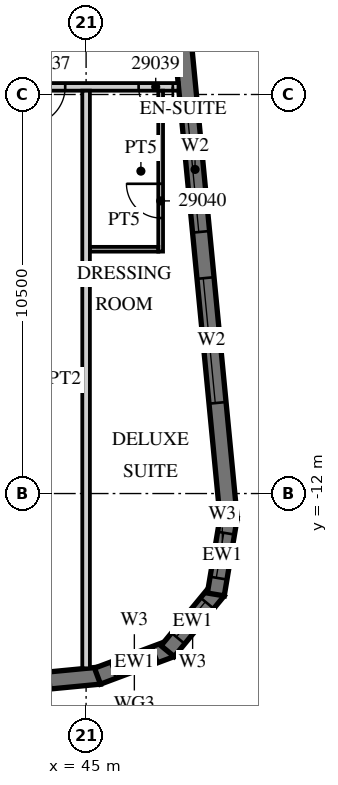
"""IFC4 building model, lengths in metres.
Left out: names, types, materials, properties, quantities, classifications, styles, units other than length and angle.
Written with IfcOpenShell. Run it as: python <this file> out.ifc"""

import sys

from ifc_helpers import new_model, si_unit, direction, frame, frame_2d, origin, place, context, subcontext, project, spatial, polyline, rectangle, outline, extrude, element, fill, save


model = new_model("IFC4")
c1 = context("Model", 3, precision=1e-05, world=origin(), true_north=direction((0.0, 1.0)))
c2 = subcontext(c1, "Body", "Model", "MODEL_VIEW")
j1 = project(units=[si_unit("LENGTHUNIT", "METRE"), si_unit("PLANEANGLEUNIT", "RADIAN")], contexts=[c1])
p1 = place(None, origin())
s1 = spatial("IfcSite", under=j1, at=p1, CompositionType="ELEMENT")
p2 = place(p1, origin())
s2 = spatial("IfcBuilding", under=s1, at=p2, CompositionType="ELEMENT")
p3 = place(p2, frame((0.0, 0.0, 130.6)))
s3 = spatial("IfcBuildingStorey", under=s2, at=p3, CompositionType="ELEMENT", Elevation=130.6)
p4 = place(p3, frame((-13.521, -22.46, 0.0), z_axis=(0.0, 0.0, 1.0), x_axis=(0.995396096335, 0.095846812164, 0.0)))
e1 = element("IfcWall", 1, at=p4, inside=s3, PredefinedType="SOLIDWALL", context=c2, shape_type="SweptSolid", body=[
    extrude(rectangle(XDim=59.151, YDim=0.45, at=frame_2d((29.575, 0.0))), origin(), (0.0, 0.0, 1.0), 3.02),
])
p5 = place(p4, frame((0.91, 0.0, 0.45)))
e2 = element("IfcOpeningElement", 2, at=p5, cuts=e1, PredefinedType="OPENING", context=c2, shape_type="SweptSolid", body=[
    extrude(rectangle(XDim=2.7, YDim=2.25, at=frame_2d((1.35, 1.125))), frame((0.0, 0.235, 0.0), z_axis=(0.0, -1.0, 0.0), x_axis=(1.0, 0.0, 0.0)), (0.0, 0.0, 1.0), 0.47),
])
p6 = place(p4, frame((5.431, 0.0, 0.45)))
e3 = element("IfcOpeningElement", 3, at=p6, cuts=e1, PredefinedType="OPENING", context=c2, shape_type="SweptSolid", body=[
    extrude(rectangle(XDim=2.7, YDim=2.25, at=frame_2d((1.35, 1.125))), frame((0.0, 0.235, 0.0), z_axis=(0.0, -1.0, 0.0), x_axis=(1.0, 0.0, 0.0)), (0.0, 0.0, 1.0), 0.47),
])
p7 = place(p4, frame((9.952, 0.0, 0.45)))
e4 = element("IfcOpeningElement", 4, at=p7, cuts=e1, PredefinedType="OPENING", context=c2, shape_type="SweptSolid", body=[
    extrude(rectangle(XDim=2.7, YDim=2.25, at=frame_2d((1.35, 1.125))), frame((0.0, 0.235, 0.0), z_axis=(0.0, -1.0, 0.0), x_axis=(1.0, 0.0, 0.0)), (0.0, 0.0, 1.0), 0.47),
])
p8 = place(p4, frame((14.473, 0.0, 0.45)))
e5 = element("IfcOpeningElement", 5, at=p8, cuts=e1, PredefinedType="OPENING", context=c2, shape_type="SweptSolid", body=[
    extrude(rectangle(XDim=2.7, YDim=2.25, at=frame_2d((1.35, 1.125))), frame((0.0, 0.235, 0.0), z_axis=(0.0, -1.0, 0.0), x_axis=(1.0, 0.0, 0.0)), (0.0, 0.0, 1.0), 0.47),
])
p9 = place(p4, frame((18.994, 0.0, 0.45)))
e6 = element("IfcOpeningElement", 6, at=p9, cuts=e1, PredefinedType="OPENING", context=c2, shape_type="SweptSolid", body=[
    extrude(rectangle(XDim=2.7, YDim=2.25, at=frame_2d((1.35, 1.125))), frame((0.0, 0.235, 0.0), z_axis=(0.0, -1.0, 0.0), x_axis=(1.0, 0.0, 0.0)), (0.0, 0.0, 1.0), 0.47),
])
p10 = place(p4, frame((23.514, 0.0, 0.45)))
e7 = element("IfcOpeningElement", 7, at=p10, cuts=e1, PredefinedType="OPENING", context=c2, shape_type="SweptSolid", body=[
    extrude(rectangle(XDim=2.7, YDim=2.25, at=frame_2d((1.35, 1.125))), frame((0.0, 0.235, 0.0), z_axis=(0.0, -1.0, 0.0), x_axis=(1.0, 0.0, 0.0)), (0.0, 0.0, 1.0), 0.47),
])
p11 = place(p4, frame((28.035, 0.0, 0.45)))
e8 = element("IfcOpeningElement", 8, at=p11, cuts=e1, PredefinedType="OPENING", context=c2, shape_type="SweptSolid", body=[
    extrude(rectangle(XDim=2.7, YDim=2.25, at=frame_2d((1.35, 1.125))), frame((0.0, 0.235, 0.0), z_axis=(0.0, -1.0, 0.0), x_axis=(1.0, 0.0, 0.0)), (0.0, 0.0, 1.0), 0.47),
])
p12 = place(p4, frame((32.556, 0.0, 0.45)))
e9 = element("IfcOpeningElement", 9, at=p12, cuts=e1, PredefinedType="OPENING", context=c2, shape_type="SweptSolid", body=[
    extrude(rectangle(XDim=2.7, YDim=2.25, at=frame_2d((1.35, 1.125))), frame((0.0, 0.235, 0.0), z_axis=(0.0, -1.0, 0.0), x_axis=(1.0, 0.0, 0.0)), (0.0, 0.0, 1.0), 0.47),
])
p13 = place(p4, frame((37.077, 0.0, 0.45)))
e10 = element("IfcOpeningElement", 10, at=p13, cuts=e1, PredefinedType="OPENING", context=c2, shape_type="SweptSolid", body=[
    extrude(rectangle(XDim=2.7, YDim=2.25, at=frame_2d((1.35, 1.125))), frame((0.0, 0.235, 0.0), z_axis=(0.0, -1.0, 0.0), x_axis=(1.0, 0.0, 0.0)), (0.0, 0.0, 1.0), 0.47),
])
p14 = place(p4, frame((41.598, 0.0, 0.45)))
e11 = element("IfcOpeningElement", 11, at=p14, cuts=e1, PredefinedType="OPENING", context=c2, shape_type="SweptSolid", body=[
    extrude(rectangle(XDim=2.7, YDim=2.25, at=frame_2d((1.35, 1.125))), frame((0.0, 0.235, 0.0), z_axis=(0.0, -1.0, 0.0), x_axis=(1.0, 0.0, 0.0)), (0.0, 0.0, 1.0), 0.47),
])
p15 = place(p4, frame((46.118, 0.0, 0.45)))
e12 = element("IfcOpeningElement", 12, at=p15, cuts=e1, PredefinedType="OPENING", context=c2, shape_type="SweptSolid", body=[
    extrude(rectangle(XDim=2.7, YDim=2.25, at=frame_2d((1.35, 1.125))), frame((0.0, 0.235, 0.0), z_axis=(0.0, -1.0, 0.0), x_axis=(1.0, 0.0, 0.0)), (0.0, 0.0, 1.0), 0.47),
])
p16 = place(p4, frame((50.639, 0.0, 0.45)))
e13 = element("IfcOpeningElement", 13, at=p16, cuts=e1, PredefinedType="OPENING", context=c2, shape_type="SweptSolid", body=[
    extrude(rectangle(XDim=2.7, YDim=2.25, at=frame_2d((1.35, 1.125))), frame((0.0, 0.235, 0.0), z_axis=(0.0, -1.0, 0.0), x_axis=(1.0, 0.0, 0.0)), (0.0, 0.0, 1.0), 0.47),
])
p17 = place(p4, frame((55.15, 0.0, 0.45)))
e14 = element("IfcOpeningElement", 14, at=p17, cuts=e1, PredefinedType="OPENING", context=c2, shape_type="SweptSolid", body=[
    extrude(rectangle(XDim=2.7, YDim=2.25, at=frame_2d((1.35, 1.125))), frame((0.0, 0.235, 0.0), z_axis=(0.0, -1.0, 0.0), x_axis=(1.0, 0.0, 0.0)), (0.0, 0.0, 1.0), 0.47),
])
p18 = place(p3, frame((45.3, -16.804, 0.0), z_axis=(0.0, 0.0, 1.0), x_axis=(0.936677599948, 0.350192909346, 0.0)))
e15 = element("IfcWall", 15, at=p18, inside=s3, PredefinedType="SOLIDWALL", context=c2, shape_type="SweptSolid", body=[
    extrude(outline(polyline([(0.0, -0.225), (2.071, -0.225), (1.95, 0.225), (0.121, 0.225), (0.0, -0.225)])), origin(), (0.0, 0.0, 1.0), 3.02),
])
p19 = place(p18, frame((0.435, 0.0, 0.45)))
e16 = element("IfcOpeningElement", 16, at=p19, cuts=e15, PredefinedType="OPENING", context=c2, shape_type="SweptSolid", body=[
    extrude(rectangle(XDim=1.2, YDim=2.25, at=frame_2d((0.6, 1.125))), frame((0.0, 0.235, 0.0), z_axis=(0.0, -1.0, 0.0), x_axis=(1.0, 0.0, 0.0)), (0.0, 0.0, 1.0), 0.47),
])
p20 = place(p3, frame((47.145, -16.147, 0.0), z_axis=(0.0, 0.0, 1.0), x_axis=(0.635988241739, 0.771698747161, 0.0)))
e17 = element("IfcWall", 17, at=p20, inside=s3, PredefinedType="SOLIDWALL", context=c2, shape_type="SweptSolid", body=[
    extrude(outline(polyline([(0.0, -0.225), (2.071, -0.225), (1.95, 0.225), (0.121, 0.225), (0.0, -0.225)])), origin(), (0.0, 0.0, 1.0), 3.02),
])
p21 = place(p20, frame((0.435, 0.0, 0.45)))
e18 = element("IfcOpeningElement", 18, at=p21, cuts=e17, PredefinedType="OPENING", context=c2, shape_type="SweptSolid", body=[
    extrude(rectangle(XDim=1.2, YDim=2.25, at=frame_2d((0.6, 1.125))), frame((0.0, 0.235, 0.0), z_axis=(0.0, -1.0, 0.0), x_axis=(1.0, 0.0, 0.0)), (0.0, 0.0, 1.0), 0.47),
])
p22 = place(p3, frame((48.413, -14.655, 0.0), z_axis=(0.0, 0.0, 1.0), x_axis=(0.165068144653, 0.986282164302, 0.0)))
e19 = element("IfcWall", 19, at=p22, inside=s3, PredefinedType="SOLIDWALL", context=c2, shape_type="SweptSolid", body=[
    extrude(outline(polyline([(0.0, -0.225), (2.071, -0.225), (1.95, 0.225), (0.121, 0.225), (0.0, -0.225)])), origin(), (0.0, 0.0, 1.0), 3.02),
])
p23 = place(p22, frame((0.435, 0.0, 0.45)))
e20 = element("IfcOpeningElement", 20, at=p23, cuts=e19, PredefinedType="OPENING", context=c2, shape_type="SweptSolid", body=[
    extrude(rectangle(XDim=1.2, YDim=2.25, at=frame_2d((0.6, 1.125))), frame((0.0, 0.235, 0.0), z_axis=(0.0, -1.0, 0.0), x_axis=(1.0, 0.0, 0.0)), (0.0, 0.0, 1.0), 0.47),
])
p24 = place(p3, frame((48.753, -12.672, 0.0), z_axis=(0.0, 0.0, 1.0), x_axis=(-0.095842661909, 0.995396495954, 0.0)))
e21 = element("IfcWall", 21, at=p24, inside=s3, PredefinedType="SOLIDWALL", context=c2, shape_type="SweptSolid", body=[
    extrude(rectangle(XDim=35.0, YDim=0.45, at=frame_2d((17.5, 0.0))), origin(), (0.0, 0.0, 1.0), 3.02),
])
p25 = place(p24, frame((3.072, 0.0, 0.45)))
e22 = element("IfcOpeningElement", 22, at=p25, cuts=e21, PredefinedType="OPENING", context=c2, shape_type="SweptSolid", body=[
    extrude(rectangle(XDim=3.3, YDim=2.25, at=frame_2d((1.65, 1.125))), frame((0.0, 0.235, 0.0), z_axis=(0.0, -1.0, 0.0), x_axis=(1.0, 0.0, 0.0)), (0.0, 0.0, 1.0), 0.47),
])
p26 = place(p24, frame((7.593, 0.0, 0.45)))
e23 = element("IfcOpeningElement", 23, at=p26, cuts=e21, PredefinedType="OPENING", context=c2, shape_type="SweptSolid", body=[
    extrude(rectangle(XDim=3.3, YDim=2.25, at=frame_2d((1.65, 1.125))), frame((0.0, 0.235, 0.0), z_axis=(0.0, -1.0, 0.0), x_axis=(1.0, 0.0, 0.0)), (0.0, 0.0, 1.0), 0.47),
])
p27 = place(p3, frame((-13.5, -1.3, 0.0), z_axis=(0.0, 0.0, 1.0), x_axis=(1.0, 0.0, 0.0)))
e24 = element("IfcWall", 24, at=p27, inside=s3, PredefinedType="PARTITIONING", context=c2, shape_type="SweptSolid", body=[
    extrude(rectangle(XDim=60.932, YDim=0.2, at=frame_2d((30.466, 0.0))), origin(), (0.0, 0.0, 1.0), 3.02),
])
p28 = place(p27, frame((2.925, 0.0, 0.0)))
e25 = element("IfcOpeningElement", 25, at=p28, cuts=e24, PredefinedType="OPENING", context=c2, shape_type="SweptSolid", body=[
    extrude(rectangle(XDim=1.0, YDim=2.1, at=frame_2d((0.5, 1.05))), frame((0.0, 0.11, 0.0), z_axis=(0.0, -1.0, 0.0), x_axis=(1.0, 0.0, 0.0)), (0.0, 0.0, 1.0), 0.22),
])
p29 = place(p27, frame((9.863, 0.0, 0.0)))
e26 = element("IfcOpeningElement", 26, at=p29, cuts=e24, PredefinedType="OPENING", context=c2, shape_type="SweptSolid", body=[
    extrude(rectangle(XDim=1.2, YDim=2.1, at=frame_2d((0.6, 1.05))), frame((0.0, 0.11, 0.0), z_axis=(0.0, -1.0, 0.0), x_axis=(1.0, 0.0, 0.0)), (0.0, 0.0, 1.0), 0.22),
])
p30 = place(p27, frame((14.075, 0.0, 0.0)))
e27 = element("IfcOpeningElement", 27, at=p30, cuts=e24, PredefinedType="OPENING", context=c2, shape_type="SweptSolid", body=[
    extrude(rectangle(XDim=1.0, YDim=2.1, at=frame_2d((0.5, 1.05))), frame((0.0, 0.11, 0.0), z_axis=(0.0, -1.0, 0.0), x_axis=(1.0, 0.0, 0.0)), (0.0, 0.0, 1.0), 0.22),
])
p31 = place(p27, frame((18.55, 0.0, 0.0)))
e28 = element("IfcOpeningElement", 28, at=p31, cuts=e24, PredefinedType="OPENING", context=c2, shape_type="SweptSolid", body=[
    extrude(rectangle(XDim=1.0, YDim=2.1, at=frame_2d((0.5, 1.05))), frame((0.0, 0.11, 0.0), z_axis=(0.0, -1.0, 0.0), x_axis=(1.0, 0.0, 0.0)), (0.0, 0.0, 1.0), 0.22),
])
p32 = place(p27, frame((24.938, 0.0, 0.0)))
e29 = element("IfcOpeningElement", 29, at=p32, cuts=e24, PredefinedType="OPENING", context=c2, shape_type="SweptSolid", body=[
    extrude(rectangle(XDim=1.2, YDim=2.1, at=frame_2d((0.6, 1.05))), frame((0.0, 0.11, 0.0), z_axis=(0.0, -1.0, 0.0), x_axis=(1.0, 0.0, 0.0)), (0.0, 0.0, 1.0), 0.22),
])
p33 = place(p27, frame((36.862, 0.0, 0.0)))
e30 = element("IfcOpeningElement", 30, at=p33, cuts=e24, PredefinedType="OPENING", context=c2, shape_type="SweptSolid", body=[
    extrude(rectangle(XDim=1.2, YDim=2.1, at=frame_2d((0.6, 1.05))), frame((0.0, 0.11, 0.0), z_axis=(0.0, -1.0, 0.0), x_axis=(1.0, 0.0, 0.0)), (0.0, 0.0, 1.0), 0.22),
])
p34 = place(p27, frame((41.075, 0.0, 0.0)))
e31 = element("IfcOpeningElement", 31, at=p34, cuts=e24, PredefinedType="OPENING", context=c2, shape_type="SweptSolid", body=[
    extrude(rectangle(XDim=1.0, YDim=2.1, at=frame_2d((0.5, 1.05))), frame((0.0, 0.11, 0.0), z_axis=(0.0, -1.0, 0.0), x_axis=(1.0, 0.0, 0.0)), (0.0, 0.0, 1.0), 0.22),
])
p35 = place(p27, frame((45.55, 0.0, 0.0)))
e32 = element("IfcOpeningElement", 32, at=p35, cuts=e24, PredefinedType="OPENING", context=c2, shape_type="SweptSolid", body=[
    extrude(rectangle(XDim=1.0, YDim=2.1, at=frame_2d((0.5, 1.05))), frame((0.0, 0.11, 0.0), z_axis=(0.0, -1.0, 0.0), x_axis=(1.0, 0.0, 0.0)), (0.0, 0.0, 1.0), 0.22),
])
p36 = place(p27, frame((52.425, 0.0, 0.0)))
e33 = element("IfcOpeningElement", 33, at=p36, cuts=e24, PredefinedType="OPENING", context=c2, shape_type="SweptSolid", body=[
    extrude(rectangle(XDim=1.0, YDim=2.1, at=frame_2d((0.5, 1.05))), frame((0.0, 0.11, 0.0), z_axis=(0.0, -1.0, 0.0), x_axis=(1.0, 0.0, 0.0)), (0.0, 0.0, 1.0), 0.22),
])
p37 = place(p27, frame((56.95, 0.0, 0.0)))
e34 = element("IfcOpeningElement", 34, at=p37, cuts=e24, PredefinedType="OPENING", context=c2, shape_type="SweptSolid", body=[
    extrude(rectangle(XDim=1.0, YDim=2.1, at=frame_2d((0.5, 1.05))), frame((0.0, 0.11, 0.0), z_axis=(0.0, -1.0, 0.0), x_axis=(1.0, 0.0, 0.0)), (0.0, 0.0, 1.0), 0.22),
])
p38 = place(p27, frame((59.882, 0.0, 0.0)))
e35 = element("IfcOpeningElement", 35, at=p38, cuts=e24, PredefinedType="OPENING", context=c2, shape_type="SweptSolid", body=[
    extrude(rectangle(XDim=0.9, YDim=2.1, at=frame_2d((0.45, 1.05))), frame((0.0, 0.11, 0.0), z_axis=(0.0, -1.0, 0.0), x_axis=(1.0, 0.0, 0.0)), (0.0, 0.0, 1.0), 0.22),
])
p39 = place(p3, frame((45.0, -16.599, 0.0), z_axis=(0.0, 0.0, 1.0), x_axis=(0.0, 1.0, 0.0)))
e36 = element("IfcWall", 36, at=p39, inside=s3, PredefinedType="PARTITIONING", context=c2, shape_type="SweptSolid", body=[
    extrude(rectangle(XDim=15.199, YDim=0.2, at=frame_2d((7.6, 0.0))), origin(), (0.0, 0.0, 1.0), 3.02),
])
p40 = place(p3, frame((46.962, -5.634, 0.0), z_axis=(0.0, 0.0, 1.0), x_axis=(0.0, 1.0, 0.0)))
e37 = element("IfcWall", 37, at=p40, inside=s3, PredefinedType="PARTITIONING", context=c2, shape_type="SweptSolid", body=[
    extrude(rectangle(XDim=4.234, YDim=0.125, at=frame_2d((2.117, 0.0))), origin(), (0.0, 0.0, 1.0), 3.02),
])
p41 = place(p40, frame((0.884, 0.0, 0.0)))
e38 = element("IfcOpeningElement", 38, at=p41, cuts=e37, PredefinedType="OPENING", context=c2, shape_type="SweptSolid", body=[
    extrude(rectangle(XDim=0.9, YDim=2.1, at=frame_2d((0.45, 1.05))), frame((0.0, 0.073, 0.0), z_axis=(0.0, -1.0, 0.0), x_axis=(1.0, 0.0, 0.0)), (0.0, 0.0, 1.0), 0.145),
])
p42 = place(p3, frame((45.1, -5.572, 0.0), z_axis=(0.0, 0.0, 1.0), x_axis=(1.0, 0.0, 0.0)))
e39 = element("IfcWall", 39, at=p42, inside=s3, PredefinedType="PARTITIONING", context=c2, shape_type="SweptSolid", body=[
    extrude(rectangle(XDim=1.8, YDim=0.125, at=frame_2d((0.9, 0.0))), origin(), (0.0, 0.0, 1.0), 3.02),
])
p43 = place(p19, origin())
e40 = element("IfcWindow", 40, at=p43, inside=s3, PartitioningType="SINGLE_PANEL", PredefinedType="WINDOW", context=c2, shape_type="SweptSolid", body=[
    extrude(rectangle(XDim=1.2, YDim=2.25, at=frame_2d((0.6, 1.125))), frame((0.0, 0.09, 0.0), z_axis=(0.0, -1.0, 0.0), x_axis=(1.0, 0.0, 0.0)), (0.0, 0.0, 1.0), 0.06),
])
fill(e16, e40)
p44 = place(p21, origin())
e41 = element("IfcWindow", 41, at=p44, inside=s3, PartitioningType="SINGLE_PANEL", PredefinedType="WINDOW", context=c2, shape_type="SweptSolid", body=[
    extrude(rectangle(XDim=1.2, YDim=2.25, at=frame_2d((0.6, 1.125))), frame((0.0, 0.09, 0.0), z_axis=(0.0, -1.0, 0.0), x_axis=(1.0, 0.0, 0.0)), (0.0, 0.0, 1.0), 0.06),
])
fill(e18, e41)
p45 = place(p23, origin())
e42 = element("IfcWindow", 42, at=p45, inside=s3, PartitioningType="SINGLE_PANEL", PredefinedType="WINDOW", context=c2, shape_type="SweptSolid", body=[
    extrude(rectangle(XDim=1.2, YDim=2.25, at=frame_2d((0.6, 1.125))), frame((0.0, 0.09, 0.0), z_axis=(0.0, -1.0, 0.0), x_axis=(1.0, 0.0, 0.0)), (0.0, 0.0, 1.0), 0.06),
])
fill(e20, e42)
p46 = place(p25, origin())
e43 = element("IfcWindow", 43, at=p46, inside=s3, PartitioningType="SINGLE_PANEL", PredefinedType="WINDOW", context=c2, shape_type="SweptSolid", body=[
    extrude(rectangle(XDim=3.3, YDim=2.25, at=frame_2d((1.65, 1.125))), frame((0.0, 0.09, 0.0), z_axis=(0.0, -1.0, 0.0), x_axis=(1.0, 0.0, 0.0)), (0.0, 0.0, 1.0), 0.06),
])
fill(e22, e43)
p47 = place(p26, origin())
e44 = element("IfcWindow", 44, at=p47, inside=s3, PartitioningType="SINGLE_PANEL", PredefinedType="WINDOW", context=c2, shape_type="SweptSolid", body=[
    extrude(rectangle(XDim=3.3, YDim=2.25, at=frame_2d((1.65, 1.125))), frame((0.0, 0.09, 0.0), z_axis=(0.0, -1.0, 0.0), x_axis=(1.0, 0.0, 0.0)), (0.0, 0.0, 1.0), 0.06),
])
fill(e23, e44)
p48 = place(p37, origin())
e45 = element("IfcDoor", 45, at=p48, inside=s3, OperationType="SINGLE_SWING_LEFT", PredefinedType="DOOR", context=c2, shape_type="SweptSolid", body=[
    extrude(rectangle(XDim=1.0, YDim=2.1, at=frame_2d((0.5, 1.05))), frame((0.0, 0.025, 0.0), z_axis=(0.0, -1.0, 0.0), x_axis=(1.0, 0.0, 0.0)), (0.0, 0.0, 1.0), 0.05),
])
fill(e34, e45)
p49 = place(p38, origin())
e46 = element("IfcDoor", 46, at=p49, inside=s3, OperationType="SINGLE_SWING_RIGHT", PredefinedType="DOOR", context=c2, shape_type="SweptSolid", body=[
    extrude(rectangle(XDim=0.9, YDim=2.1, at=frame_2d((0.45, 1.05))), frame((0.0, 0.025, 0.0), z_axis=(0.0, -1.0, 0.0), x_axis=(1.0, 0.0, 0.0)), (0.0, 0.0, 1.0), 0.05),
])
fill(e35, e46)
p50 = place(p41, origin())
e47 = element("IfcDoor", 47, at=p50, inside=s3, OperationType="SINGLE_SWING_RIGHT", PredefinedType="DOOR", context=c2, shape_type="SweptSolid", body=[
    extrude(rectangle(XDim=0.9, YDim=2.1, at=frame_2d((0.45, 1.05))), frame((0.0, 0.025, 0.0), z_axis=(0.0, -1.0, 0.0), x_axis=(1.0, 0.0, 0.0)), (0.0, 0.0, 1.0), 0.05),
])
fill(e38, e47)
save(model, sys.argv[1])
